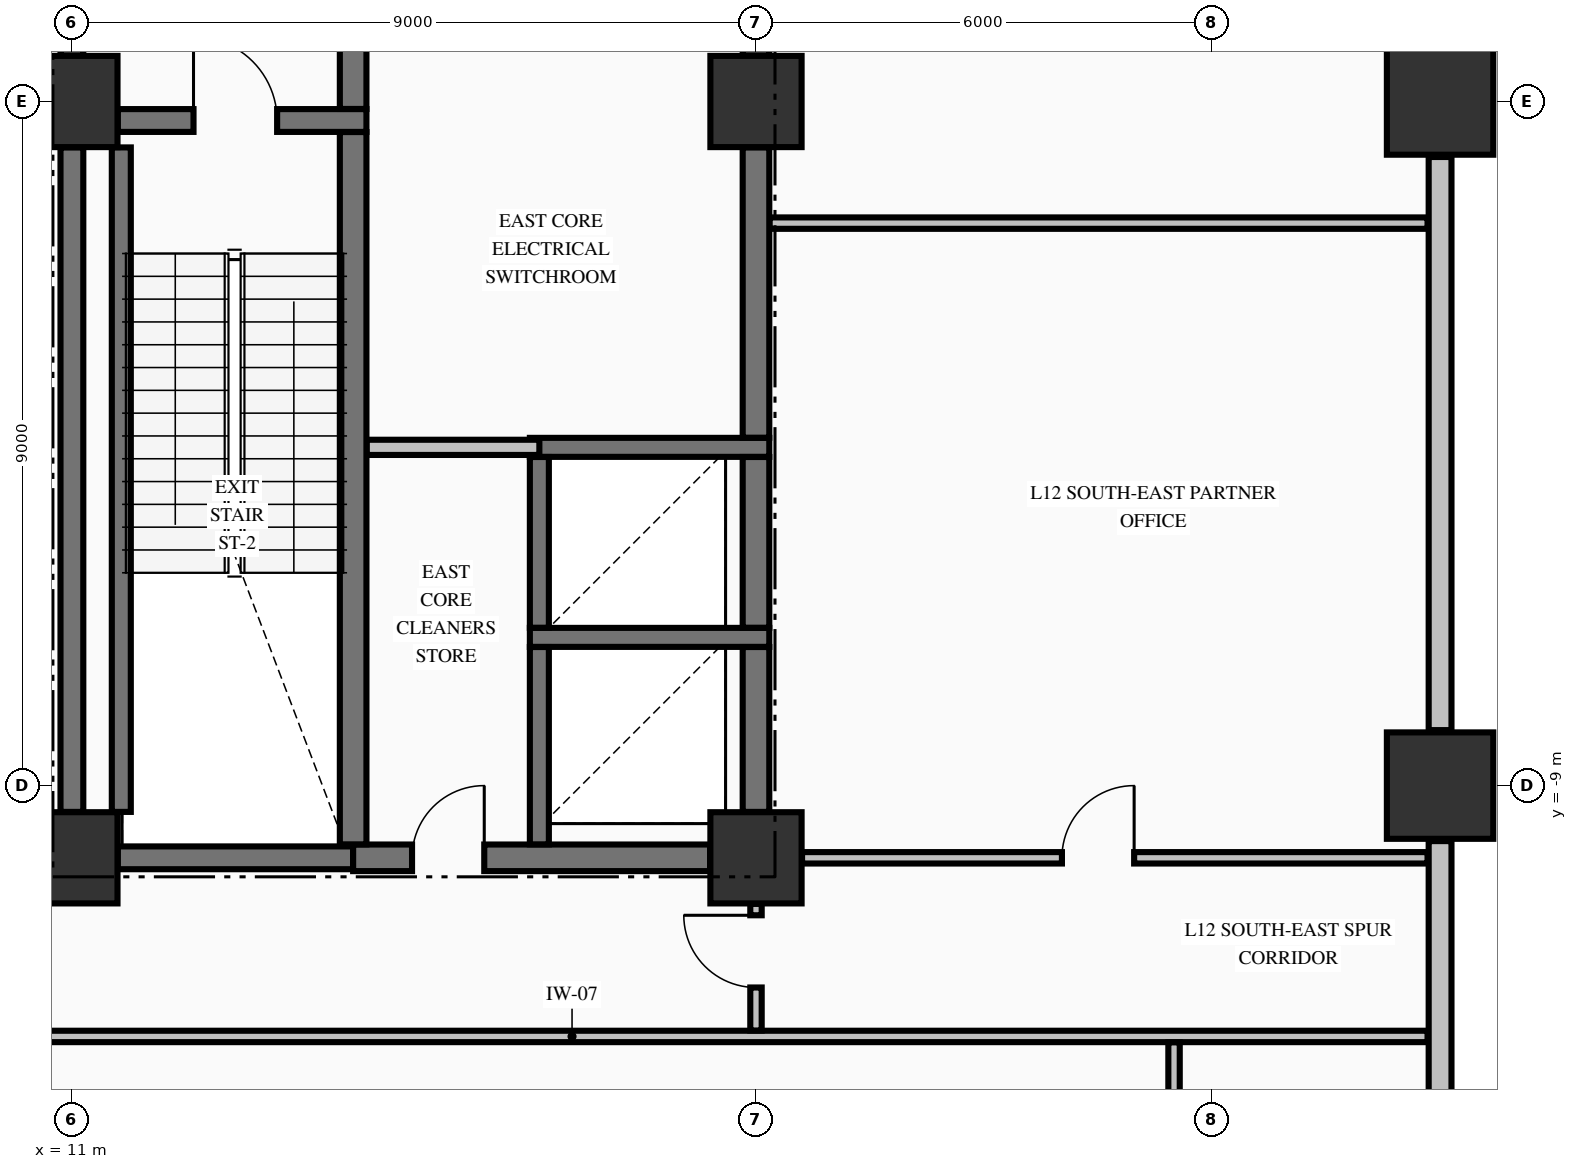
"""IFC4 building model, lengths in metres.
Left out: names, types, materials, properties, quantities, classifications, styles, units other than length and angle.
Written with IfcOpenShell. Run it as: python <this file> out.ifc"""

import sys

from ifc_helpers import new_model, si_unit, direction, frame, frame_2d, origin, origin_2d, place, context, subcontext, project, spatial, rectangle, extrude, element, fill, save


model = new_model("IFC4")
c1 = context("Model", 3, precision=1e-05, world=origin(), true_north=direction((0.0, 1.0)))
c2 = subcontext(c1, "Body", "Model", "MODEL_VIEW")
j1 = project(units=[si_unit("LENGTHUNIT", "METRE"), si_unit("PLANEANGLEUNIT", "RADIAN")], contexts=[c1])
p1 = place(None, origin())
s1 = spatial("IfcSite", under=j1, at=p1, CompositionType="ELEMENT")
p2 = place(p1, origin())
s2 = spatial("IfcBuilding", under=s1, at=p2, CompositionType="ELEMENT")
p3 = place(p2, frame((0.0, 0.0, 52.19)))
s3 = spatial("IfcBuildingStorey", under=s2, at=p3, CompositionType="ELEMENT", Elevation=52.19)
for number, where, z_axis, x_axis in (
    (1, (29.0, -9.0, -0.425), (0.0, 0.0, 1.0), (1.0, 0.0, 0.0)),
    (2, (29.0, 0.0, -0.425), (0.0, 0.0, 1.0), (1.0, 0.0, 0.0)),
):
    element("IfcColumn", number, at=place(p3, frame(where, z_axis=z_axis, x_axis=x_axis)), inside=s3, PredefinedType="COLUMN", context=c2, shape_type="SweptSolid", body=[
        extrude(rectangle(XDim=1.4, YDim=1.4, at=origin_2d()), origin(), (0.0, 0.0, 1.0), 5.0),
    ])
for number, where, z_axis, x_axis in (
    (3, (11.0, -9.95, -0.425), (0.0, 0.0, 1.0), (1.0, 0.0, 0.0)),
    (4, (11.0, 0.0, -0.425), (0.0, 0.0, 1.0), (1.0, 0.0, 0.0)),
    (5, (20.0, -9.95, -0.425), (0.0, 0.0, 1.0), (1.0, 0.0, 0.0)),
    (6, (20.0, 0.0, -0.425), (0.0, 0.0, 1.0), (1.0, 0.0, 0.0)),
):
    element("IfcColumn", number, at=place(p3, frame(where, z_axis=z_axis, x_axis=x_axis)), inside=s3, PredefinedType="COLUMN", context=c2, shape_type="SweptSolid", body=[
        extrude(rectangle(XDim=1.2, YDim=1.2, at=origin_2d()), origin(), (0.0, 0.0, 1.0), 5.0),
    ])
p4 = place(p3, frame((29.0, -22.27, 0.0), z_axis=(0.0, 0.0, 1.0), x_axis=(0.0, 1.0, 0.0)))
e7 = element("IfcWall", 7, at=p4, inside=s3, PredefinedType="STANDARD", context=c2, shape_type="SweptSolid", body=[
    extrude(rectangle(XDim=12.54, YDim=0.3, at=frame_2d((6.27, 0.0))), origin(), (0.0, 0.0, 1.0), 2.167),
])
p5 = place(p3, frame((29.0, -8.27, 0.0), z_axis=(0.0, 0.0, 1.0), x_axis=(0.0, 1.0, 0.0)))
e8 = element("IfcWall", 8, at=p5, inside=s3, PredefinedType="STANDARD", context=c2, shape_type="SweptSolid", body=[
    extrude(rectangle(XDim=7.54, YDim=0.3, at=frame_2d((3.77, 0.0))), origin(), (0.0, 0.0, 1.0), 2.167),
])
p6 = place(p3, frame((11.604, -9.95, 0.0), z_axis=(0.0, 0.0, 1.0), x_axis=(1.0, 0.0, 0.0)))
e9 = element("IfcWall", 9, at=p6, inside=s3, PredefinedType="SHEAR", context=c2, shape_type="SweptSolid", body=[
    extrude(rectangle(XDim=3.096, YDim=0.3, at=frame_2d((1.548, 0.0))), origin(), (0.0, 0.0, 1.0), 4.575),
])
p7 = place(p3, frame((14.7, -9.95, 0.0), z_axis=(0.0, 0.0, 1.0), x_axis=(1.0, 0.0, 0.0)))
e10 = element("IfcWall", 10, at=p7, inside=s3, PredefinedType="SHEAR", context=c2, shape_type="SweptSolid", body=[
    extrude(rectangle(XDim=4.696, YDim=0.35, at=frame_2d((2.348, 0.0))), origin(), (0.0, 0.0, 1.0), 4.575),
])
p8 = place(p7, frame((0.775, 0.0, 0.0)))
e11 = element("IfcOpeningElement", 11, at=p8, cuts=e10, PredefinedType="OPENING", context=c2, shape_type="SweptSolid", body=[
    extrude(rectangle(XDim=0.95, YDim=2.15, at=frame_2d((0.475, 1.075))), frame((0.0, 0.185, 0.0), z_axis=(0.0, -1.0, 0.0), x_axis=(1.0, 0.0, 0.0)), (0.0, 0.0, 1.0), 0.37),
])
for number, where, z_axis, x_axis in (
    (12, (17.025, -7.05, 0.0), (0.0, 0.0, 1.0), (1.0, 0.0, 0.0)),
    (13, (17.025, -4.55, 0.0), (0.0, 0.0, 1.0), (1.0, 0.0, 0.0)),
):
    element("IfcWall", number, at=place(p3, frame(where, z_axis=z_axis, x_axis=x_axis)), inside=s3, PredefinedType="SOLIDWALL", context=c2, shape_type="SweptSolid", body=[
        extrude(rectangle(XDim=3.15, YDim=0.25, at=frame_2d((1.575, 0.0))), origin(), (0.0, 0.0, 1.0), 4.575),
    ])
p9 = place(p3, frame((11.604, -0.25, 0.0), z_axis=(0.0, 0.0, 1.0), x_axis=(1.0, 0.0, 0.0)))
e14 = element("IfcWall", 14, at=p9, inside=s3, PredefinedType="SHEAR", context=c2, shape_type="SweptSolid", body=[
    extrude(rectangle(XDim=3.271, YDim=0.3, at=frame_2d((1.635, 0.0))), origin(), (0.0, 0.0, 1.0), 4.575),
])
p10 = place(p9, frame((0.996, 0.0, 0.0)))
e15 = element("IfcOpeningElement", 15, at=p10, cuts=e14, PredefinedType="OPENING", context=c2, shape_type="SweptSolid", body=[
    extrude(rectangle(XDim=1.1, YDim=2.15, at=frame_2d((0.55, 1.075))), frame((0.0, 0.16, 0.0), z_axis=(0.0, -1.0, 0.0), x_axis=(1.0, 0.0, 0.0)), (0.0, 0.0, 1.0), 0.32),
])
p11 = place(p3, frame((-23.835, -12.3, 0.0), z_axis=(0.0, 0.0, 1.0), x_axis=(1.0, 0.0, 0.0)))
e16 = element("IfcWall", 16, at=p11, inside=s3, PredefinedType="PARTITIONING", context=c2, shape_type="SweptSolid", body=[
    extrude(rectangle(XDim=52.67, YDim=0.15, at=frame_2d((26.335, 0.0))), origin(), (0.0, 0.0, 1.0), 4.575),
])
p12 = place(p11, frame((8.99, 0.0, 0.0)))
e17 = element("IfcOpeningElement", 17, at=p12, cuts=e16, PredefinedType="OPENING", context=c2, shape_type="SweptSolid", body=[
    extrude(rectangle(XDim=1.05, YDim=2.15, at=frame_2d((0.525, 1.075))), frame((0.0, 0.085, 0.0), z_axis=(0.0, -1.0, 0.0), x_axis=(1.0, 0.0, 0.0)), (0.0, 0.0, 1.0), 0.17),
])
p13 = place(p11, frame((20.96, 0.0, 0.0)))
e18 = element("IfcOpeningElement", 18, at=p13, cuts=e16, PredefinedType="OPENING", context=c2, shape_type="SweptSolid", body=[
    extrude(rectangle(XDim=1.05, YDim=2.15, at=frame_2d((0.525, 1.075))), frame((0.0, 0.085, 0.0), z_axis=(0.0, -1.0, 0.0), x_axis=(1.0, 0.0, 0.0)), (0.0, 0.0, 1.0), 0.17),
])
p14 = place(p11, frame((29.11, 0.0, 0.0)))
e19 = element("IfcOpeningElement", 19, at=p14, cuts=e16, PredefinedType="OPENING", context=c2, shape_type="SweptSolid", body=[
    extrude(rectangle(XDim=1.05, YDim=2.15, at=frame_2d((0.525, 1.075))), frame((0.0, 0.085, 0.0), z_axis=(0.0, -1.0, 0.0), x_axis=(1.0, 0.0, 0.0)), (0.0, 0.0, 1.0), 0.17),
])
p15 = place(p3, frame((20.606, -9.95, 0.0), z_axis=(0.0, 0.0, 1.0), x_axis=(1.0, 0.0, 0.0)))
e20 = element("IfcWall", 20, at=p15, inside=s3, PredefinedType="PARTITIONING", context=c2, shape_type="SweptSolid", body=[
    extrude(rectangle(XDim=8.229, YDim=0.15, at=frame_2d((4.115, 0.0))), origin(), (0.0, 0.0, 1.0), 4.575),
])
p16 = place(p15, frame((3.419, 0.0, 0.0)))
e21 = element("IfcOpeningElement", 21, at=p16, cuts=e20, PredefinedType="OPENING", context=c2, shape_type="SweptSolid", body=[
    extrude(rectangle(XDim=0.95, YDim=2.02, at=frame_2d((0.475, 1.01))), frame((0.0, 0.085, 0.0), z_axis=(0.0, -1.0, 0.0), x_axis=(1.0, 0.0, 0.0)), (0.0, 0.0, 1.0), 0.17),
])
p17 = place(p3, frame((14.878, -4.55, 0.0), z_axis=(0.0, 0.0, 1.0), x_axis=(1.0, 0.0, 0.0)))
e22 = element("IfcWall", 22, at=p17, inside=s3, PredefinedType="PARTITIONING", context=c2, shape_type="SweptSolid", body=[
    extrude(rectangle(XDim=2.272, YDim=0.2, at=frame_2d((1.136, 0.0))), origin(), (0.0, 0.0, 1.0), 4.575),
])
p18 = place(p3, frame((20.178, -1.6, 0.0), z_axis=(0.0, 0.0, 1.0), x_axis=(1.0, 0.0, 0.0)))
e23 = element("IfcWall", 23, at=p18, inside=s3, PredefinedType="PARTITIONING", context=c2, shape_type="SweptSolid", body=[
    extrude(rectangle(XDim=8.657, YDim=0.15, at=frame_2d((4.329, 0.0))), origin(), (0.0, 0.0, 1.0), 4.575),
])
p19 = place(p3, frame((11.0, -9.346, 0.0), z_axis=(0.0, 0.0, 1.0), x_axis=(0.0, 1.0, 0.0)))
e24 = element("IfcWall", 24, at=p19, inside=s3, PredefinedType="SHEAR", context=c2, shape_type="SweptSolid", body=[
    extrude(rectangle(XDim=8.742, YDim=0.3, at=frame_2d((4.371, 0.0))), origin(), (0.0, 0.0, 1.0), 4.575),
])
p20 = place(p3, frame((11.0, 0.604, 0.0), z_axis=(0.0, 0.0, 1.0), x_axis=(0.0, 1.0, 0.0)))
e25 = element("IfcWall", 25, at=p20, inside=s3, PredefinedType="SHEAR", context=c2, shape_type="SweptSolid", body=[
    extrude(rectangle(XDim=2.144, YDim=0.3, at=frame_2d((1.072, 0.0))), origin(), (0.0, 0.0, 1.0), 4.575),
])
p21 = place(p20, frame((0.496, 0.0, 0.0)))
e26 = element("IfcOpeningElement", 26, at=p21, cuts=e25, PredefinedType="OPENING", context=c2, shape_type="SweptSolid", body=[
    extrude(rectangle(XDim=1.1, YDim=2.15, at=frame_2d((0.55, 1.075))), frame((0.0, 0.16, 0.0), z_axis=(0.0, -1.0, 0.0), x_axis=(1.0, 0.0, 0.0)), (0.0, 0.0, 1.0), 0.32),
])
p22 = place(p3, frame((11.65, -9.346, 0.0), z_axis=(0.0, 0.0, 1.0), x_axis=(0.0, 1.0, 0.0)))
e27 = element("IfcWall", 27, at=p22, inside=s3, PredefinedType="SOLIDWALL", context=c2, shape_type="SweptSolid", body=[
    extrude(rectangle(XDim=8.742, YDim=0.25, at=frame_2d((4.371, 0.0))), origin(), (0.0, 0.0, 1.0), 4.575),
])
p23 = place(p3, frame((14.7, -9.773, 0.0), z_axis=(0.0, 0.0, 1.0), x_axis=(0.0, 1.0, 0.0)))
e28 = element("IfcWall", 28, at=p23, inside=s3, PredefinedType="SHEAR", context=c2, shape_type="SweptSolid", body=[
    extrude(rectangle(XDim=9.371, YDim=0.35, at=frame_2d((4.686, 0.0))), origin(), (0.0, 0.0, 1.0), 4.575),
])
p24 = place(p3, frame((14.7, -0.098, 0.0), z_axis=(0.0, 0.0, 1.0), x_axis=(0.0, 1.0, 0.0)))
e29 = element("IfcWall", 29, at=p24, inside=s3, PredefinedType="SHEAR", context=c2, shape_type="SweptSolid", body=[
    extrude(rectangle(XDim=2.846, YDim=0.35, at=frame_2d((1.423, 0.0))), origin(), (0.0, 0.0, 1.0), 4.575),
])
p25 = place(p3, frame((17.15, -9.773, 0.0), z_axis=(0.0, 0.0, 1.0), x_axis=(0.0, 1.0, 0.0)))
e30 = element("IfcWall", 30, at=p25, inside=s3, PredefinedType="SOLIDWALL", context=c2, shape_type="SweptSolid", body=[
    extrude(rectangle(XDim=2.596, YDim=0.25, at=frame_2d((1.298, 0.0))), origin(), (0.0, 0.0, 1.0), 4.575),
])
p26 = place(p3, frame((17.15, -6.923, 0.0), z_axis=(0.0, 0.0, 1.0), x_axis=(0.0, 1.0, 0.0)))
e31 = element("IfcWall", 31, at=p26, inside=s3, PredefinedType="SOLIDWALL", context=c2, shape_type="SweptSolid", body=[
    extrude(rectangle(XDim=2.246, YDim=0.25, at=frame_2d((1.123, 0.0))), origin(), (0.0, 0.0, 1.0), 4.575),
])
p27 = place(p3, frame((20.0, -9.346, 0.0), z_axis=(0.0, 0.0, 1.0), x_axis=(0.0, 1.0, 0.0)))
e32 = element("IfcWall", 32, at=p27, inside=s3, PredefinedType="SHEAR", context=c2, shape_type="SweptSolid", body=[
    extrude(rectangle(XDim=2.169, YDim=0.35, at=frame_2d((1.084, 0.0))), origin(), (0.0, 0.0, 1.0), 4.575),
])
p28 = place(p3, frame((20.0, -6.923, 0.0), z_axis=(0.0, 0.0, 1.0), x_axis=(0.0, 1.0, 0.0)))
e33 = element("IfcWall", 33, at=p28, inside=s3, PredefinedType="SHEAR", context=c2, shape_type="SweptSolid", body=[
    extrude(rectangle(XDim=2.246, YDim=0.35, at=frame_2d((1.123, 0.0))), origin(), (0.0, 0.0, 1.0), 4.575),
])
p29 = place(p3, frame((20.0, -4.423, 0.0), z_axis=(0.0, 0.0, 1.0), x_axis=(0.0, 1.0, 0.0)))
e34 = element("IfcWall", 34, at=p29, inside=s3, PredefinedType="SHEAR", context=c2, shape_type="SweptSolid", body=[
    extrude(rectangle(XDim=3.819, YDim=0.35, at=frame_2d((1.91, 0.0))), origin(), (0.0, 0.0, 1.0), 4.575),
])
p30 = place(p3, frame((20.0, 0.604, 0.0), z_axis=(0.0, 0.0, 1.0), x_axis=(0.0, 1.0, 0.0)))
e35 = element("IfcWall", 35, at=p30, inside=s3, PredefinedType="SHEAR", context=c2, shape_type="SweptSolid", body=[
    extrude(rectangle(XDim=9.292, YDim=0.35, at=frame_2d((4.646, 0.0))), origin(), (0.0, 0.0, 1.0), 4.575),
])
p31 = place(p3, frame((20.0, -12.222, 0.0), z_axis=(0.0, 0.0, 1.0), x_axis=(0.0, 1.0, 0.0)))
e36 = element("IfcWall", 36, at=p31, inside=s3, PredefinedType="PARTITIONING", context=c2, shape_type="SweptSolid", body=[
    extrude(rectangle(XDim=1.666, YDim=0.15, at=frame_2d((0.833, 0.0))), origin(), (0.0, 0.0, 1.0), 4.575),
])
p32 = place(p31, frame((0.566, 0.0, 0.0)))
e37 = element("IfcOpeningElement", 37, at=p32, cuts=e36, PredefinedType="OPENING", context=c2, shape_type="SweptSolid", body=[
    extrude(rectangle(XDim=0.95, YDim=2.02, at=frame_2d((0.475, 1.01))), frame((0.0, 0.085, 0.0), z_axis=(0.0, -1.0, 0.0), x_axis=(1.0, 0.0, 0.0)), (0.0, 0.0, 1.0), 0.17),
])
p33 = place(p3, frame((25.5, -22.294, 0.0), z_axis=(0.0, 0.0, 1.0), x_axis=(0.0, 1.0, 0.0)))
e38 = element("IfcWall", 38, at=p33, inside=s3, PredefinedType="PARTITIONING", context=c2, shape_type="SweptSolid", body=[
    extrude(rectangle(XDim=9.916, YDim=0.15, at=frame_2d((4.958, 0.0))), origin(), (0.0, 0.0, 1.0), 4.575),
])
p34 = place(p10, origin())
e39 = element("IfcDoor", 39, at=p34, inside=s3, OperationType="SINGLE_SWING_LEFT", PredefinedType="DOOR", context=c2, shape_type="SweptSolid", body=[
    extrude(rectangle(XDim=1.1, YDim=2.15, at=frame_2d((0.55, 1.075))), frame((0.0, 0.025, 0.0), z_axis=(0.0, -1.0, 0.0), x_axis=(1.0, 0.0, 0.0)), (0.0, 0.0, 1.0), 0.05),
])
fill(e15, e39)
p35 = place(p8, origin())
e40 = element("IfcDoor", 40, at=p35, inside=s3, OperationType="SINGLE_SWING_RIGHT", PredefinedType="DOOR", context=c2, shape_type="SweptSolid", body=[
    extrude(rectangle(XDim=0.95, YDim=2.15, at=frame_2d((0.475, 1.075))), frame((0.0, 0.025, 0.0), z_axis=(0.0, -1.0, 0.0), x_axis=(1.0, 0.0, 0.0)), (0.0, 0.0, 1.0), 0.05),
])
fill(e11, e40)
p36 = place(p32, origin())
e41 = element("IfcDoor", 41, at=p36, inside=s3, OperationType="SINGLE_SWING_RIGHT", PredefinedType="DOOR", context=c2, shape_type="SweptSolid", body=[
    extrude(rectangle(XDim=0.95, YDim=2.02, at=frame_2d((0.475, 1.01))), frame((0.0, 0.025, 0.0), z_axis=(0.0, -1.0, 0.0), x_axis=(1.0, 0.0, 0.0)), (0.0, 0.0, 1.0), 0.05),
])
fill(e37, e41)
p37 = place(p16, origin())
e42 = element("IfcDoor", 42, at=p37, inside=s3, OperationType="SINGLE_SWING_RIGHT", PredefinedType="DOOR", context=c2, shape_type="SweptSolid", body=[
    extrude(rectangle(XDim=0.95, YDim=2.02, at=frame_2d((0.475, 1.01))), frame((0.0, 0.025, 0.0), z_axis=(0.0, -1.0, 0.0), x_axis=(1.0, 0.0, 0.0)), (0.0, 0.0, 1.0), 0.05),
])
fill(e21, e42)
save(model, sys.argv[1])
